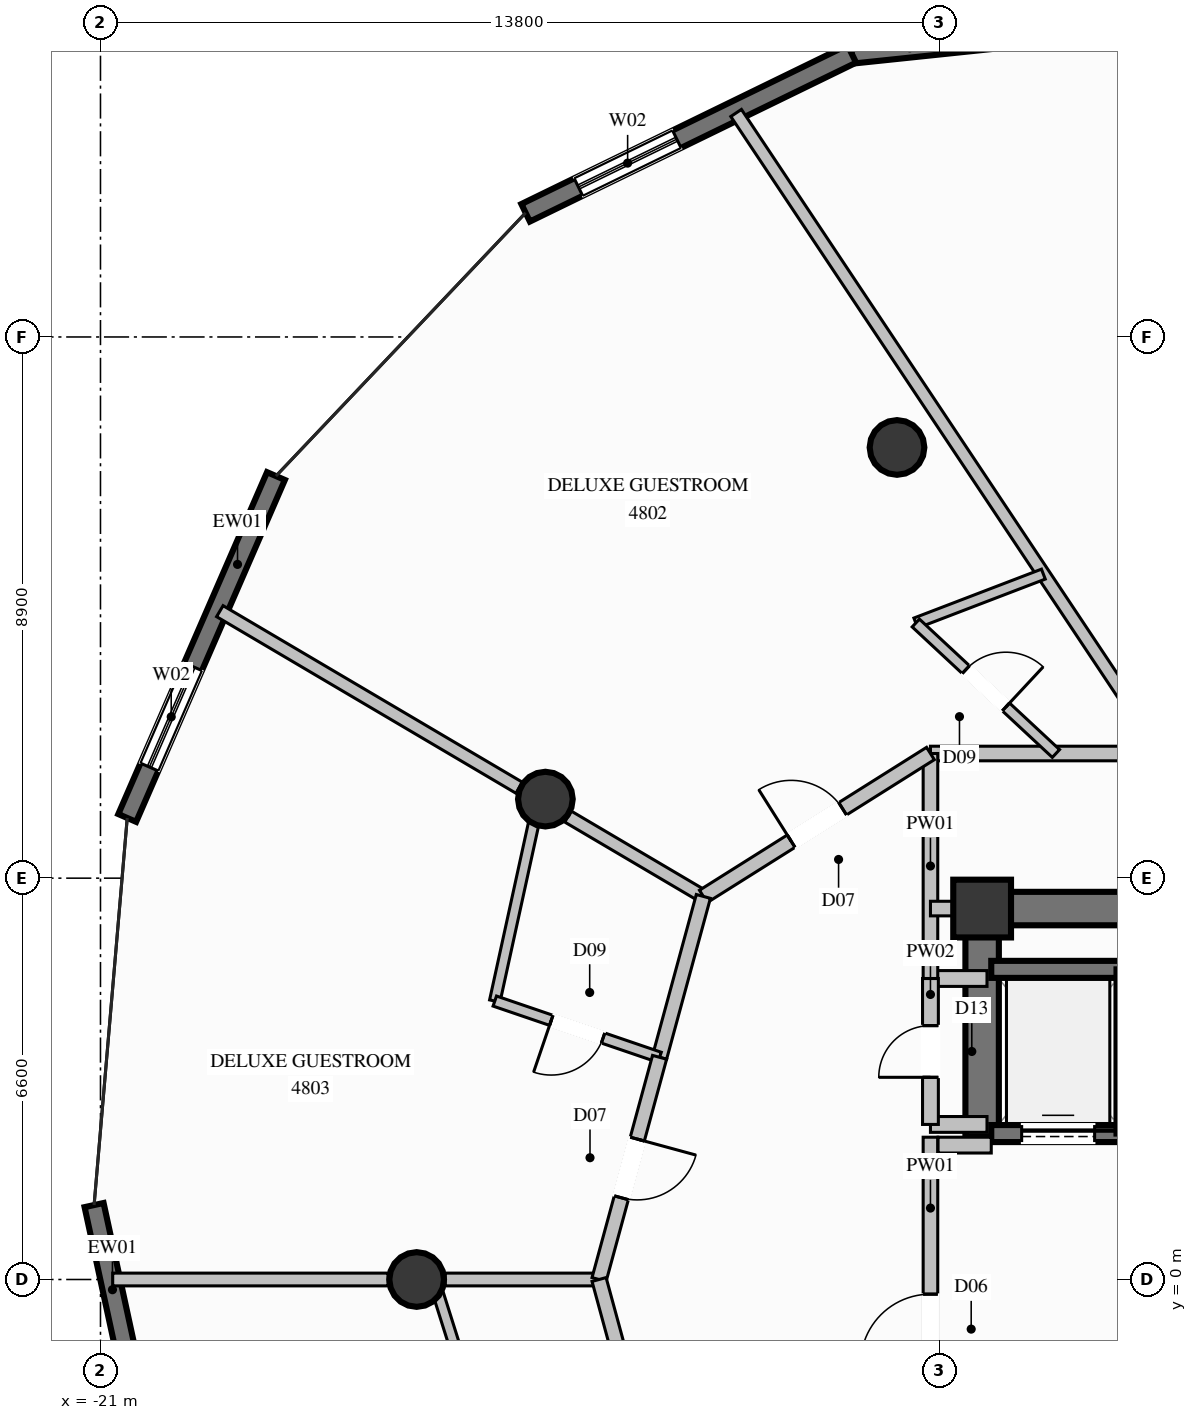
"""IFC4 building model, lengths in metres.
Left out: names, types, materials, properties, quantities, classifications, styles, units other than length and angle.
Written with IfcOpenShell. Run it as: python <this file> out.ifc"""

import sys

from ifc_helpers import new_model, si_unit, direction, frame, frame_2d, origin, origin_2d, place, context, subcontext, project, spatial, rectangle, circle, extrude, element, fill, save


model = new_model("IFC4")
c1 = context("Model", 3, precision=1e-05, world=origin(), true_north=direction((0.0, 1.0)))
c2 = subcontext(c1, "Body", "Model", "MODEL_VIEW")
j1 = project(units=[si_unit("LENGTHUNIT", "METRE"), si_unit("PLANEANGLEUNIT", "RADIAN")], contexts=[c1])
p1 = place(None, origin())
s1 = spatial("IfcSite", under=j1, at=p1, CompositionType="ELEMENT")
p2 = place(p1, origin())
s2 = spatial("IfcBuilding", under=s1, at=p2, CompositionType="ELEMENT")
p3 = place(p2, frame((0.0, 0.0, 180.4)))
s3 = spatial("IfcBuildingStorey", under=s2, at=p3, CompositionType="ELEMENT", Elevation=180.4)
p4 = place(p3, frame((-6.5, 6.1, 0.0), z_axis=(0.0, 0.0, 1.0), x_axis=(1.0, 0.0, 0.0)))
e1 = element("IfcColumn", 1, at=p4, inside=s3, PredefinedType="COLUMN", context=c2, shape_type="SweptSolid", body=[
    extrude(rectangle(XDim=0.95, YDim=0.95, at=origin_2d()), origin(), (0.0, 0.0, 1.0), 3.6),
])
p5 = place(p3, frame((-6.225, 6.1, 0.0), z_axis=(0.0, 0.0, 1.0), x_axis=(1.0, 0.0, 0.0)))
e2 = element("IfcWall", 2, at=p5, inside=s3, PredefinedType="SHEAR", context=c2, shape_type="SweptSolid", body=[
    extrude(rectangle(XDim=2.625, YDim=0.55, at=frame_2d((1.312, 0.0))), origin(), (0.0, 0.0, 1.0), 3.6),
])
p6 = place(p3, frame((-6.5, 2.35, 0.0), z_axis=(0.0, 0.0, 1.0), x_axis=(0.0, 1.0, 0.0)))
e3 = element("IfcWall", 3, at=p6, inside=s3, PredefinedType="SHEAR", context=c2, shape_type="SweptSolid", body=[
    extrude(rectangle(XDim=4.025, YDim=0.55, at=frame_2d((2.012, 0.0))), origin(), (0.0, 0.0, 1.0), 3.6),
])
for number, where, z_axis, x_axis in (
    (4, (-7.9, 13.683, 0.0), (0.0, 0.0, 1.0), (1.0, 0.0, 0.0)),
    (5, (-13.683, 7.9, 0.0), (0.0, 0.0, 1.0), (1.0, 0.0, 0.0)),
    (6, (-15.8, 0.0, 0.0), (0.0, 0.0, 1.0), (1.0, 0.0, 0.0)),
):
    element("IfcColumn", number, at=place(p3, frame(where, z_axis=z_axis, x_axis=x_axis)), inside=s3, PredefinedType="COLUMN", context=c2, shape_type="SweptSolid", body=[
        extrude(circle(Radius=0.45, at=origin_2d()), origin(), (0.0, 0.0, 1.0), 3.6),
    ])
p7 = place(p3, frame((-8.643, 20.155, 0.0), z_axis=(0.0, 0.0, 1.0), x_axis=(0.994556170884, 0.104201837585, 0.0)))
e7 = element("IfcWall", 7, at=p7, inside=s3, PredefinedType="SOLIDWALL", context=c2, shape_type="SweptSolid", body=[
    extrude(rectangle(XDim=6.132, YDim=0.32, at=frame_2d((3.066, 0.0))), origin(), (0.0, 0.0, 1.0), 3.36),
])
p8 = place(p7, frame((2.166, 0.0, 0.35)))
e8 = element("IfcOpeningElement", 8, at=p8, cuts=e7, PredefinedType="OPENING", context=c2, shape_type="SweptSolid", body=[
    extrude(rectangle(XDim=1.8, YDim=2.6, at=frame_2d((0.9, 1.3))), frame((0.0, 0.17, 0.0), z_axis=(0.0, -1.0, 0.0), x_axis=(1.0, 0.0, 0.0)), (0.0, 0.0, 1.0), 0.34),
])
p9 = place(p3, frame((-14.008, 17.542, 0.0), z_axis=(0.0, 0.0, 1.0), x_axis=(0.899034471399, 0.437877858811, 0.0)))
e9 = element("IfcWall", 9, at=p9, inside=s3, PredefinedType="SOLIDWALL", context=c2, shape_type="SweptSolid", body=[
    extrude(rectangle(XDim=5.968, YDim=0.32, at=frame_2d((2.984, 0.0))), origin(), (0.0, 0.0, 1.0), 3.36),
])
p10 = place(p9, frame((0.966, 0.0, 0.35)))
e10 = element("IfcOpeningElement", 10, at=p10, cuts=e9, PredefinedType="OPENING", context=c2, shape_type="SweptSolid", body=[
    extrude(rectangle(XDim=1.8, YDim=2.6, at=frame_2d((0.9, 1.3))), frame((0.0, 0.17, 0.0), z_axis=(0.0, -1.0, 0.0), x_axis=(1.0, 0.0, 0.0)), (0.0, 0.0, 1.0), 0.34),
])
p11 = place(p3, frame((-20.56, 7.59, 0.0), z_axis=(0.0, 0.0, 1.0), x_axis=(0.398911001453, 0.916989647117, 0.0)))
e11 = element("IfcWall", 11, at=p11, inside=s3, PredefinedType="SOLIDWALL", context=c2, shape_type="SweptSolid", body=[
    extrude(rectangle(XDim=6.132, YDim=0.32, at=frame_2d((3.066, 0.0))), origin(), (0.0, 0.0, 1.0), 3.36),
])
p12 = place(p11, frame((0.913, 0.0, 0.35)))
e12 = element("IfcOpeningElement", 12, at=p12, cuts=e11, PredefinedType="OPENING", context=c2, shape_type="SweptSolid", body=[
    extrude(rectangle(XDim=1.8, YDim=2.6, at=frame_2d((0.9, 1.3))), frame((0.0, 0.17, 0.0), z_axis=(0.0, -1.0, 0.0), x_axis=(1.0, 0.0, 0.0)), (0.0, 0.0, 1.0), 0.34),
])
p13 = place(p3, frame((-19.698, -5.262, 0.0), z_axis=(0.0, 0.0, 1.0), x_axis=(-0.211992849193, 0.977271217161, 0.0)))
e13 = element("IfcWall", 13, at=p13, inside=s3, PredefinedType="SOLIDWALL", context=c2, shape_type="SweptSolid", body=[
    extrude(rectangle(XDim=6.637, YDim=0.32, at=frame_2d((3.318, 0.0))), origin(), (0.0, 0.0, 1.0), 3.36),
])
p14 = place(p13, frame((1.738, 0.0, 0.35)))
e14 = element("IfcOpeningElement", 14, at=p14, cuts=e13, PredefinedType="OPENING", context=c2, shape_type="SweptSolid", body=[
    extrude(rectangle(XDim=1.8, YDim=2.6, at=frame_2d((0.9, 1.3))), frame((0.0, 0.17, 0.0), z_axis=(0.0, -1.0, 0.0), x_axis=(1.0, 0.0, 0.0)), (0.0, 0.0, 1.0), 0.34),
])
p15 = place(p3, frame((-6.35, 2.4, 0.0), z_axis=(0.0, 0.0, 1.0), x_axis=(1.0, 0.0, 0.0)))
e15 = element("IfcWall", 15, at=p15, inside=s3, PredefinedType="SOLIDWALL", context=c2, shape_type="SweptSolid", body=[
    extrude(rectangle(XDim=2.2, YDim=0.28, at=frame_2d((1.1, 0.0))), origin(), (0.0, 0.0, 1.0), 3.36),
])
p16 = place(p15, frame((0.5, 0.0, 0.0)))
e16 = element("IfcOpeningElement", 16, at=p16, cuts=e15, PredefinedType="OPENING", context=c2, shape_type="SweptSolid", body=[
    extrude(rectangle(XDim=1.2, YDim=2.2, at=frame_2d((0.6, 1.1))), frame((0.0, 0.15, 0.0), z_axis=(0.0, -1.0, 0.0), x_axis=(1.0, 0.0, 0.0)), (0.0, 0.0, 1.0), 0.3),
])
p17 = place(p3, frame((-4.15, 5.1, 0.0), z_axis=(0.0, 0.0, 1.0), x_axis=(-1.0, 0.0, 0.0)))
e17 = element("IfcWall", 17, at=p17, inside=s3, PredefinedType="SOLIDWALL", context=c2, shape_type="SweptSolid", body=[
    extrude(rectangle(XDim=2.2, YDim=0.28, at=frame_2d((1.1, 0.0))), origin(), (0.0, 0.0, 1.0), 3.36),
])
p18 = place(p3, frame((-4.15, 2.4, 0.0), z_axis=(0.0, 0.0, 1.0), x_axis=(0.0, 1.0, 0.0)))
e18 = element("IfcWall", 18, at=p18, inside=s3, PredefinedType="SOLIDWALL", context=c2, shape_type="SweptSolid", body=[
    extrude(rectangle(XDim=2.7, YDim=0.28, at=frame_2d((1.35, 0.0))), origin(), (0.0, 0.0, 1.0), 3.36),
])
p19 = place(p3, frame((-7.35, -2.78, 0.0), z_axis=(0.0, 0.0, 1.0), x_axis=(0.0, 1.0, 0.0)))
e19 = element("IfcWall", 19, at=p19, inside=s3, PredefinedType="PARTITIONING", context=c2, shape_type="SweptSolid", body=[
    extrude(rectangle(XDim=5.12, YDim=0.24, at=frame_2d((2.56, 0.0))), origin(), (0.0, 0.0, 1.0), 2.445),
])
p20 = place(p19, frame((1.389, 0.0, 0.0)))
e20 = element("IfcOpeningElement", 20, at=p20, cuts=e19, PredefinedType="OPENING", context=c2, shape_type="SweptSolid", body=[
    extrude(rectangle(XDim=1.15, YDim=2.2, at=frame_2d((0.575, 1.1))), frame((0.0, 0.13, 0.0), z_axis=(0.0, -1.0, 0.0), x_axis=(1.0, 0.0, 0.0)), (0.0, 0.0, 1.0), 0.26),
])
p21 = place(p3, frame((-7.225, 2.21, 0.0), z_axis=(0.0, 0.0, 1.0), x_axis=(1.0, 0.0, 0.0)))
e21 = element("IfcWall", 21, at=p21, inside=s3, PredefinedType="PARTITIONING", context=c2, shape_type="SweptSolid", body=[
    extrude(rectangle(XDim=0.875, YDim=0.26, at=frame_2d((0.438, 0.0))), origin(), (0.0, 0.0, 1.0), 3.36),
])
for number, where, z_axis, x_axis in (
    (22, (-7.35, 4.95, 0.0), (0.0, 0.0, 1.0), (1.0, 0.0, 0.0)),
    (23, (-7.35, 2.55, 0.0), (0.0, 0.0, 1.0), (1.0, 0.0, 0.0)),
):
    element("IfcWall", number, at=place(p3, frame(where, z_axis=z_axis, x_axis=x_axis)), inside=s3, PredefinedType="PARTITIONING", context=c2, shape_type="SweptSolid", body=[
        extrude(rectangle(XDim=0.93, YDim=0.26, at=frame_2d((0.465, 0.0))), origin(), (0.0, 0.0, 1.0), 3.36),
    ])
p22 = place(p3, frame((-7.35, 2.55, 0.0), z_axis=(0.0, 0.0, 1.0), x_axis=(0.0, 1.0, 0.0)))
e24 = element("IfcWall", 24, at=p22, inside=s3, PredefinedType="PARTITIONING", context=c2, shape_type="SweptSolid", body=[
    extrude(rectangle(XDim=2.4, YDim=0.26, at=frame_2d((1.2, 0.0))), origin(), (0.0, 0.0, 1.0), 2.445),
])
p23 = place(p22, frame((0.775, 0.0, 0.0)))
e25 = element("IfcOpeningElement", 25, at=p23, cuts=e24, PredefinedType="OPENING", context=c2, shape_type="SweptSolid", body=[
    extrude(rectangle(XDim=0.85, YDim=2.05, at=frame_2d((0.425, 1.025))), frame((0.0, 0.14, 0.0), z_axis=(0.0, -1.0, 0.0), x_axis=(1.0, 0.0, 0.0)), (0.0, 0.0, 1.0), 0.28),
])
p24 = place(p3, frame((-7.35, 8.65, 0.0), z_axis=(0.0, 0.0, 1.0), x_axis=(1.0, 0.0, 0.0)))
e26 = element("IfcWall", 26, at=p24, inside=s3, PredefinedType="PARTITIONING", context=c2, shape_type="SweptSolid", body=[
    extrude(rectangle(XDim=14.7, YDim=0.24, at=frame_2d((7.35, 0.0))), origin(), (0.0, 0.0, 1.0), 3.36),
])
p25 = place(p3, frame((-7.35, 4.95, 0.0), z_axis=(0.0, 0.0, 1.0), x_axis=(0.0, 1.0, 0.0)))
e27 = element("IfcWall", 27, at=p25, inside=s3, PredefinedType="PARTITIONING", context=c2, shape_type="SweptSolid", body=[
    extrude(rectangle(XDim=3.7, YDim=0.24, at=frame_2d((1.85, 0.0))), origin(), (0.0, 0.0, 1.0), 2.445),
])
p26 = place(p3, frame((-7.35, 6.1, 0.0), z_axis=(0.0, 0.0, 1.0), x_axis=(1.0, 0.0, 0.0)))
e28 = element("IfcWall", 28, at=p26, inside=s3, PredefinedType="PARTITIONING", context=c2, shape_type="SweptSolid", body=[
    extrude(rectangle(XDim=0.85, YDim=0.24, at=frame_2d((0.425, 0.0))), origin(), (0.0, 0.0, 1.0), 2.801),
])
p27 = place(p3, frame((-11.085, 6.3, 0.0), z_axis=(0.0, 0.0, 1.0), x_axis=(-0.86133622593, 0.508035339225, 0.0)))
e29 = element("IfcWall", 29, at=p27, inside=s3, PredefinedType="PARTITIONING", context=c2, shape_type="SweptSolid", body=[
    extrude(rectangle(XDim=2.584, YDim=0.21, at=frame_2d((1.292, 0.0))), origin(), (0.0, 0.0, 1.0), 2.801),
])
p28 = place(p3, frame((-14.114, 8.087, 0.0), z_axis=(0.0, 0.0, 1.0), x_axis=(-0.861313184314, 0.50807440255, 0.0)))
e30 = element("IfcWall", 30, at=p28, inside=s3, PredefinedType="PARTITIONING", context=c2, shape_type="SweptSolid", body=[
    extrude(rectangle(XDim=5.716, YDim=0.21, at=frame_2d((2.858, 0.0))), origin(), (0.0, 0.0, 1.0), 3.36),
])
p29 = place(p3, frame((-12.8, 0.0, 0.0), z_axis=(0.0, 0.0, 1.0), x_axis=(-1.0, 0.0, 0.0)))
e31 = element("IfcWall", 31, at=p29, inside=s3, PredefinedType="PARTITIONING", context=c2, shape_type="SweptSolid", body=[
    extrude(rectangle(XDim=2.53, YDim=0.21, at=frame_2d((1.265, 0.0))), origin(), (0.0, 0.0, 1.0), 3.36),
])
p30 = place(p3, frame((-16.27, 0.0, 0.0), z_axis=(0.0, 0.0, 1.0), x_axis=(-1.0, 0.0, 0.0)))
e32 = element("IfcWall", 32, at=p30, inside=s3, PredefinedType="PARTITIONING", context=c2, shape_type="SweptSolid", body=[
    extrude(rectangle(XDim=4.529, YDim=0.21, at=frame_2d((2.265, 0.0))), origin(), (0.0, 0.0, 1.0), 3.36),
])
p31 = place(p3, frame((-3.528, 8.65, 0.0), z_axis=(0.0, 0.0, 1.0), x_axis=(-0.554428653403, 0.832231258898, 0.0)))
e33 = element("IfcWall", 33, at=p31, inside=s3, PredefinedType="PARTITIONING", context=c2, shape_type="SweptSolid", body=[
    extrude(rectangle(XDim=12.658, YDim=0.21, at=frame_2d((6.329, 0.0))), origin(), (0.0, 0.0, 1.0), 3.36),
])
p32 = place(p3, frame((-7.591, 10.796, 0.0), z_axis=(0.0, 0.0, 1.0), x_axis=(0.933759431782, 0.357901276273, 0.0)))
e34 = element("IfcWall", 34, at=p32, inside=s3, PredefinedType="PLUMBINGWALL", context=c2, shape_type="SweptSolid", body=[
    extrude(rectangle(XDim=2.247, YDim=0.175, at=frame_2d((1.124, 0.0))), origin(), (0.0, 0.0, 1.0), 3.36),
])
p33 = place(p3, frame((-7.591, 10.796, 0.0), z_axis=(0.0, 0.0, 1.0), x_axis=(0.731925968359, -0.681384162453, 0.0)))
e35 = element("IfcWall", 35, at=p33, inside=s3, PredefinedType="PLUMBINGWALL", context=c2, shape_type="SweptSolid", body=[
    extrude(rectangle(XDim=3.149, YDim=0.175, at=frame_2d((1.575, 0.0))), origin(), (0.0, 0.0, 1.0), 3.36),
])
p34 = place(p33, frame((1.125, 0.0, 0.0)))
e36 = element("IfcOpeningElement", 36, at=p34, cuts=e35, PredefinedType="OPENING", context=c2, shape_type="SweptSolid", body=[
    extrude(rectangle(XDim=0.9, YDim=2.1, at=frame_2d((0.45, 1.05))), frame((0.0, 0.098, 0.0), z_axis=(0.0, -1.0, 0.0), x_axis=(1.0, 0.0, 0.0)), (0.0, 0.0, 1.0), 0.195),
])
p35 = place(p3, frame((-11.085, 6.3, 0.0), z_axis=(0.0, 0.0, 1.0), x_axis=(0.846409267484, 0.532532958526, 0.0)))
e37 = element("IfcWall", 37, at=p35, inside=s3, PredefinedType="PARTITIONING", context=c2, shape_type="SweptSolid", body=[
    extrude(rectangle(XDim=4.413, YDim=0.24, at=frame_2d((2.206, 0.0))), origin(), (0.0, 0.0, 1.0), 3.36),
])
p36 = place(p35, frame((1.706, 0.0, 0.0)))
e38 = element("IfcOpeningElement", 38, at=p36, cuts=e37, PredefinedType="OPENING", context=c2, shape_type="SweptSolid", body=[
    extrude(rectangle(XDim=1.0, YDim=2.2, at=frame_2d((0.5, 1.1))), frame((0.0, 0.13, 0.0), z_axis=(0.0, -1.0, 0.0), x_axis=(1.0, 0.0, 0.0)), (0.0, 0.0, 1.0), 0.26),
])
p37 = place(p3, frame((-11.085, 6.3, 0.0), z_axis=(0.0, 0.0, 1.0), x_axis=(-0.262552356383, -0.964917747872, 0.0)))
e39 = element("IfcWall", 39, at=p37, inside=s3, PredefinedType="PARTITIONING", context=c2, shape_type="SweptSolid", body=[
    extrude(rectangle(XDim=2.742, YDim=0.24, at=frame_2d((1.371, 0.0))), origin(), (0.0, 0.0, 1.0), 3.36),
])
p38 = place(p3, frame((-13.789, 7.895, 0.0), z_axis=(0.0, 0.0, 1.0), x_axis=(-0.213829865727, -0.976870917022, 0.0)))
e40 = element("IfcWall", 40, at=p38, inside=s3, PredefinedType="PLUMBINGWALL", context=c2, shape_type="SweptSolid", body=[
    extrude(rectangle(XDim=3.395, YDim=0.175, at=frame_2d((1.697, 0.0))), origin(), (0.0, 0.0, 1.0), 2.929),
])
p39 = place(p3, frame((-11.805, 3.654, 0.0), z_axis=(0.0, 0.0, 1.0), x_axis=(-0.946382283588, 0.323048871398, 0.0)))
e41 = element("IfcWall", 41, at=p39, inside=s3, PredefinedType="PLUMBINGWALL", context=c2, shape_type="SweptSolid", body=[
    extrude(rectangle(XDim=2.864, YDim=0.175, at=frame_2d((1.432, 0.0))), origin(), (0.0, 0.0, 1.0), 3.36),
])
p40 = place(p39, frame((0.982, 0.0, 0.0)))
e42 = element("IfcOpeningElement", 42, at=p40, cuts=e41, PredefinedType="OPENING", context=c2, shape_type="SweptSolid", body=[
    extrude(rectangle(XDim=0.9, YDim=2.1, at=frame_2d((0.45, 1.05))), frame((0.0, 0.098, 0.0), z_axis=(0.0, -1.0, 0.0), x_axis=(1.0, 0.0, 0.0)), (0.0, 0.0, 1.0), 0.195),
])
p41 = place(p3, frame((-11.805, 3.654, 0.0), z_axis=(0.0, 0.0, 1.0), x_axis=(-0.262762825819, -0.964860454868, 0.0)))
e43 = element("IfcWall", 43, at=p41, inside=s3, PredefinedType="PARTITIONING", context=c2, shape_type="SweptSolid", body=[
    extrude(rectangle(XDim=3.787, YDim=0.24, at=frame_2d((1.894, 0.0))), origin(), (0.0, 0.0, 1.0), 3.36),
])
p42 = place(p41, frame((1.394, 0.0, 0.0)))
e44 = element("IfcOpeningElement", 44, at=p42, cuts=e43, PredefinedType="OPENING", context=c2, shape_type="SweptSolid", body=[
    extrude(rectangle(XDim=1.0, YDim=2.2, at=frame_2d((0.5, 1.1))), frame((0.0, 0.13, 0.0), z_axis=(0.0, -1.0, 0.0), x_axis=(1.0, 0.0, 0.0)), (0.0, 0.0, 1.0), 0.26),
])
p43 = place(p3, frame((-12.8, 0.0, 0.0), z_axis=(0.0, 0.0, 1.0), x_axis=(0.262552356383, -0.964917747872, 0.0)))
e45 = element("IfcWall", 45, at=p43, inside=s3, PredefinedType="PARTITIONING", context=c2, shape_type="SweptSolid", body=[
    extrude(rectangle(XDim=2.742, YDim=0.24, at=frame_2d((1.371, 0.0))), origin(), (0.0, 0.0, 1.0), 3.36),
])
p44 = place(p3, frame((-15.52, 0.0, 0.0), z_axis=(0.0, 0.0, 1.0), x_axis=(0.300912730095, -0.953651681101, 0.0)))
e46 = element("IfcWall", 46, at=p44, inside=s3, PredefinedType="PLUMBINGWALL", context=c2, shape_type="SweptSolid", body=[
    extrude(rectangle(XDim=3.313, YDim=0.175, at=frame_2d((1.657, 0.0))), origin(), (0.0, 0.0, 1.0), 2.929),
])
p45 = place(p10, origin())
e47 = element("IfcWindow", 47, at=p45, inside=s3, PartitioningType="SINGLE_PANEL", PredefinedType="WINDOW", context=c2, shape_type="SweptSolid", body=[
    extrude(rectangle(XDim=1.8, YDim=2.6, at=frame_2d((0.9, 1.3))), frame((0.0, 0.03, 0.0), z_axis=(0.0, -1.0, 0.0), x_axis=(1.0, 0.0, 0.0)), (0.0, 0.0, 1.0), 0.06),
])
fill(e10, e47)
p46 = place(p12, origin())
e48 = element("IfcWindow", 48, at=p46, inside=s3, PartitioningType="SINGLE_PANEL", PredefinedType="WINDOW", context=c2, shape_type="SweptSolid", body=[
    extrude(rectangle(XDim=1.8, YDim=2.6, at=frame_2d((0.9, 1.3))), frame((0.0, 0.03, 0.0), z_axis=(0.0, -1.0, 0.0), x_axis=(1.0, 0.0, 0.0)), (0.0, 0.0, 1.0), 0.06),
])
fill(e12, e48)
p47 = place(p16, origin())
e49 = element("IfcDoor", 49, at=p47, inside=s3, OperationType="SLIDING_TO_LEFT", PredefinedType="DOOR", context=c2, shape_type="SweptSolid", body=[
    extrude(rectangle(XDim=1.2, YDim=2.2, at=frame_2d((0.6, 1.1))), frame((0.0, 0.025, 0.0), z_axis=(0.0, -1.0, 0.0), x_axis=(1.0, 0.0, 0.0)), (0.0, 0.0, 1.0), 0.05),
])
fill(e16, e49)
p48 = place(p20, origin())
e50 = element("IfcDoor", 50, at=p48, inside=s3, OperationType="SINGLE_SWING_LEFT", PredefinedType="DOOR", context=c2, shape_type="SweptSolid", body=[
    extrude(rectangle(XDim=1.15, YDim=2.2, at=frame_2d((0.575, 1.1))), frame((0.0, 0.025, 0.0), z_axis=(0.0, -1.0, 0.0), x_axis=(1.0, 0.0, 0.0)), (0.0, 0.0, 1.0), 0.05),
])
fill(e20, e50)
p49 = place(p23, origin())
e51 = element("IfcDoor", 51, at=p49, inside=s3, OperationType="SINGLE_SWING_LEFT", PredefinedType="DOOR", context=c2, shape_type="SweptSolid", body=[
    extrude(rectangle(XDim=0.85, YDim=2.05, at=frame_2d((0.425, 1.025))), frame((0.0, 0.025, 0.0), z_axis=(0.0, -1.0, 0.0), x_axis=(1.0, 0.0, 0.0)), (0.0, 0.0, 1.0), 0.05),
])
fill(e25, e51)
p50 = place(p34, origin())
e52 = element("IfcDoor", 52, at=p50, inside=s3, OperationType="SINGLE_SWING_RIGHT", PredefinedType="DOOR", context=c2, shape_type="SweptSolid", body=[
    extrude(rectangle(XDim=0.9, YDim=2.1, at=frame_2d((0.45, 1.05))), frame((0.0, 0.025, 0.0), z_axis=(0.0, -1.0, 0.0), x_axis=(1.0, 0.0, 0.0)), (0.0, 0.0, 1.0), 0.05),
])
fill(e36, e52)
p51 = place(p36, origin())
e53 = element("IfcDoor", 53, at=p51, inside=s3, OperationType="SINGLE_SWING_LEFT", PredefinedType="DOOR", context=c2, shape_type="SweptSolid", body=[
    extrude(rectangle(XDim=1.0, YDim=2.2, at=frame_2d((0.5, 1.1))), frame((0.0, 0.025, 0.0), z_axis=(0.0, -1.0, 0.0), x_axis=(1.0, 0.0, 0.0)), (0.0, 0.0, 1.0), 0.05),
])
fill(e38, e53)
p52 = place(p40, origin())
e54 = element("IfcDoor", 54, at=p52, inside=s3, OperationType="SINGLE_SWING_RIGHT", PredefinedType="DOOR", context=c2, shape_type="SweptSolid", body=[
    extrude(rectangle(XDim=0.9, YDim=2.1, at=frame_2d((0.45, 1.05))), frame((0.0, 0.025, 0.0), z_axis=(0.0, -1.0, 0.0), x_axis=(1.0, 0.0, 0.0)), (0.0, 0.0, 1.0), 0.05),
])
fill(e42, e54)
p53 = place(p42, origin())
e55 = element("IfcDoor", 55, at=p53, inside=s3, OperationType="SINGLE_SWING_LEFT", PredefinedType="DOOR", context=c2, shape_type="SweptSolid", body=[
    extrude(rectangle(XDim=1.0, YDim=2.2, at=frame_2d((0.5, 1.1))), frame((0.0, 0.025, 0.0), z_axis=(0.0, -1.0, 0.0), x_axis=(1.0, 0.0, 0.0)), (0.0, 0.0, 1.0), 0.05),
])
fill(e44, e55)
save(model, sys.argv[1])
